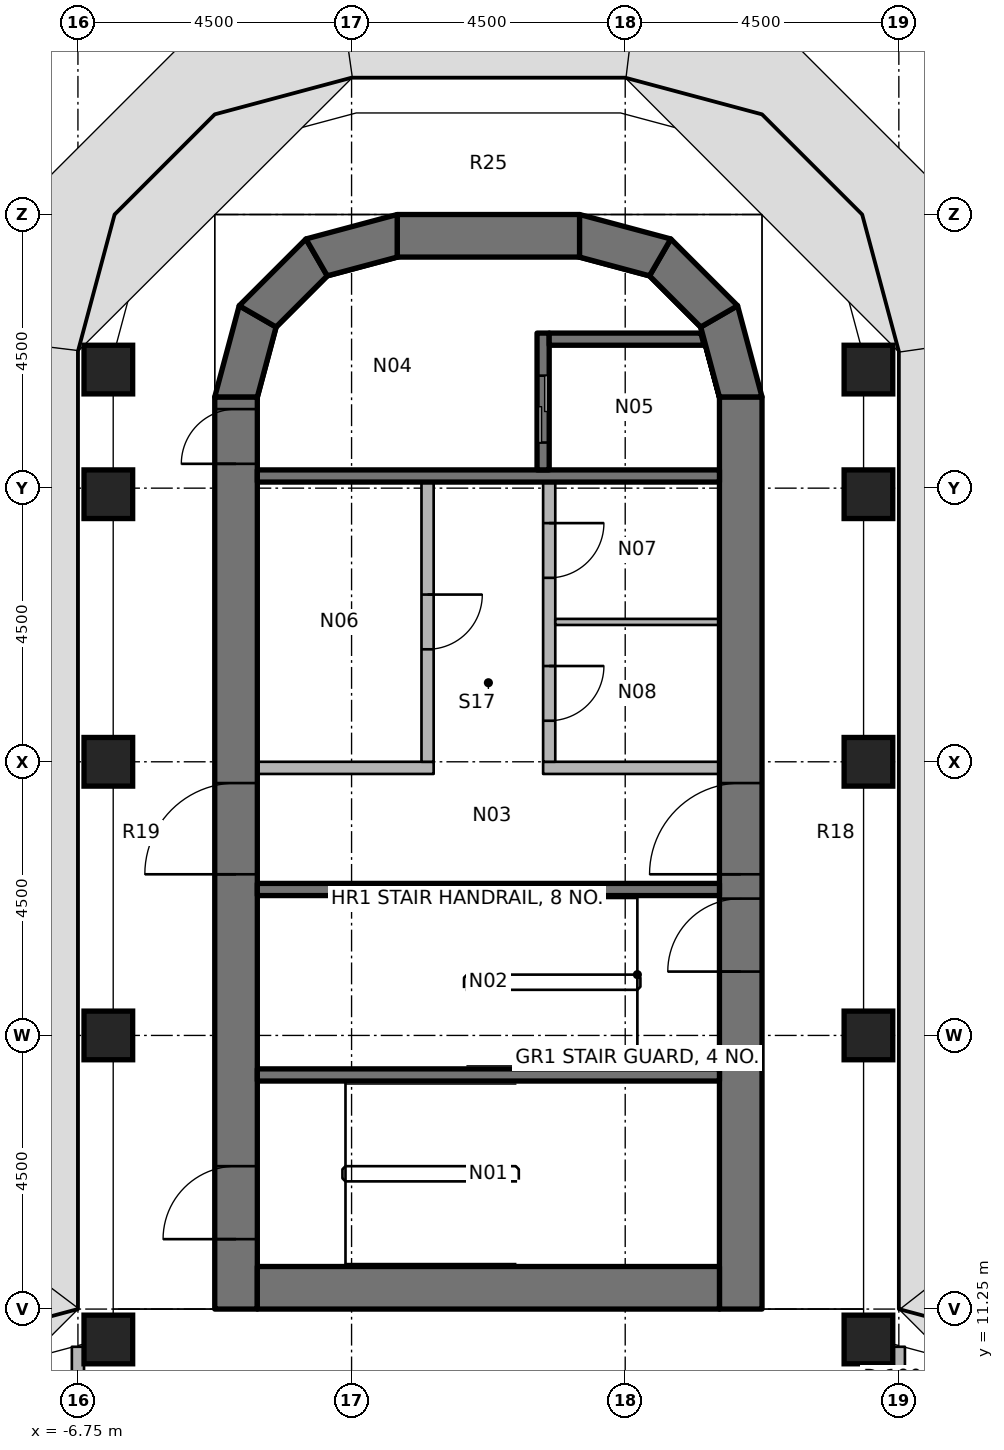
"""IFC4 building model, lengths in metres.
Left out: names, types, materials, properties, quantities, classifications, styles, units other than length and angle.
Written with IfcOpenShell. Run it as: python <this file> out.ifc"""

import sys

from ifc_helpers import new_model, si_unit, direction, frame, frame_2d, origin, origin_2d, place, context, subcontext, project, spatial, polyline, rectangle, outline, extrude, element, fill, save


model = new_model("IFC4")
c1 = context("Model", 3, precision=1e-05, world=origin(), true_north=direction((0.0, 1.0)))
c2 = subcontext(c1, "Body", "Model", "MODEL_VIEW")
j1 = project(units=[si_unit("LENGTHUNIT", "METRE"), si_unit("PLANEANGLEUNIT", "RADIAN")], contexts=[c1])
p1 = place(None, origin())
s1 = spatial("IfcSite", under=j1, at=p1, CompositionType="ELEMENT")
p2 = place(p1, origin())
s2 = spatial("IfcBuilding", under=s1, at=p2, CompositionType="ELEMENT")
p3 = place(p2, frame((0.0, 0.0, 179.0)))
s3 = spatial("IfcBuildingStorey", under=s2, at=p3, CompositionType="ELEMENT", Elevation=179.0)
for number, where, z_axis, x_axis in (
    (1, (-6.25, 10.75, 0.0), (0.0, 0.0, 1.0), (1.0, 0.0, 0.0)),
    (2, (-6.25, 15.75, 0.0), (0.0, 0.0, 1.0), (1.0, 0.0, 0.0)),
    (3, (-6.25, 20.25, 0.0), (0.0, 0.0, 1.0), (1.0, 0.0, 0.0)),
    (4, (-6.25, 24.65, 0.0), (0.0, 0.0, 1.0), (1.0, 0.0, 0.0)),
    (5, (-6.25, 26.7, 0.0), (0.0, 0.0, 1.0), (1.0, 0.0, 0.0)),
    (6, (6.25, 10.75, 0.0), (0.0, 0.0, 1.0), (1.0, 0.0, 0.0)),
    (7, (6.25, 15.75, 0.0), (0.0, 0.0, 1.0), (1.0, 0.0, 0.0)),
    (8, (6.25, 20.25, 0.0), (0.0, 0.0, 1.0), (1.0, 0.0, 0.0)),
    (9, (6.25, 24.65, 0.0), (0.0, 0.0, 1.0), (1.0, 0.0, 0.0)),
    (10, (6.25, 26.7, 0.0), (0.0, 0.0, 1.0), (1.0, 0.0, 0.0)),
):
    element("IfcColumn", number, at=place(p3, frame(where, z_axis=z_axis, x_axis=x_axis)), inside=s3, PredefinedType="COLUMN", context=c2, shape_type="SweptSolid", body=[
        extrude(rectangle(XDim=0.8, YDim=0.8, at=origin_2d()), origin(), (0.0, 0.0, 1.0), 3.65),
    ])
p4 = place(p3, frame((-4.15, 11.25, 0.0), z_axis=(0.0, 0.0, 1.0), x_axis=(0.0, 1.0, 0.0)))
e11 = element("IfcWall", 11, at=p4, inside=s3, PredefinedType="SHEAR", context=c2, shape_type="SweptSolid", body=[
    extrude(rectangle(XDim=15.0, YDim=0.7, at=frame_2d((7.5, 0.0))), origin(), (0.0, 0.0, 1.0), 3.8),
])
p5 = place(p4, frame((7.15, 0.0, 0.0)))
e12 = element("IfcOpeningElement", 12, at=p5, cuts=e11, PredefinedType="OPENING", context=c2, shape_type="SweptSolid", body=[
    extrude(rectangle(XDim=1.5, YDim=2.3, at=frame_2d((0.75, 1.15))), frame((0.0, 0.36, 0.0), z_axis=(0.0, -1.0, 0.0), x_axis=(1.0, 0.0, 0.0)), (0.0, 0.0, 1.0), 0.72),
])
p6 = place(p4, frame((13.9, 0.0, 0.0)))
e13 = element("IfcOpeningElement", 13, at=p6, cuts=e11, PredefinedType="OPENING", context=c2, shape_type="SweptSolid", body=[
    extrude(rectangle(XDim=0.9, YDim=2.1, at=frame_2d((0.45, 1.05))), frame((0.0, 0.36, 0.0), z_axis=(0.0, -1.0, 0.0), x_axis=(1.0, 0.0, 0.0)), (0.0, 0.0, 1.0), 0.72),
])
p7 = place(p4, frame((1.15, 0.0, 0.0)))
e14 = element("IfcOpeningElement", 14, at=p7, cuts=e11, PredefinedType="OPENING", context=c2, shape_type="SweptSolid", body=[
    extrude(rectangle(XDim=1.2, YDim=2.1, at=frame_2d((0.6, 1.05))), frame((0.0, 0.36, 0.0), z_axis=(0.0, -1.0, 0.0), x_axis=(1.0, 0.0, 0.0)), (0.0, 0.0, 1.0), 0.72),
])
p8 = place(p3, frame((4.15, 11.25, 0.0), z_axis=(0.0, 0.0, 1.0), x_axis=(0.0, 1.0, 0.0)))
e15 = element("IfcWall", 15, at=p8, inside=s3, PredefinedType="SHEAR", context=c2, shape_type="SweptSolid", body=[
    extrude(rectangle(XDim=15.0, YDim=0.7, at=frame_2d((7.5, 0.0))), origin(), (0.0, 0.0, 1.0), 3.8),
])
p9 = place(p8, frame((7.15, 0.0, 0.0)))
e16 = element("IfcOpeningElement", 16, at=p9, cuts=e15, PredefinedType="OPENING", context=c2, shape_type="SweptSolid", body=[
    extrude(rectangle(XDim=1.5, YDim=2.3, at=frame_2d((0.75, 1.15))), frame((0.0, 0.36, 0.0), z_axis=(0.0, -1.0, 0.0), x_axis=(1.0, 0.0, 0.0)), (0.0, 0.0, 1.0), 0.72),
])
p10 = place(p8, frame((5.55, 0.0, 0.0)))
e17 = element("IfcOpeningElement", 17, at=p10, cuts=e15, PredefinedType="OPENING", context=c2, shape_type="SweptSolid", body=[
    extrude(rectangle(XDim=1.2, YDim=2.1, at=frame_2d((0.6, 1.05))), frame((0.0, 0.36, 0.0), z_axis=(0.0, -1.0, 0.0), x_axis=(1.0, 0.0, 0.0)), (0.0, 0.0, 1.0), 0.72),
])
p11 = place(p3, frame((-3.8, 11.6, 0.0), z_axis=(0.0, 0.0, 1.0), x_axis=(1.0, 0.0, 0.0)))
e18 = element("IfcWall", 18, at=p11, inside=s3, PredefinedType="SHEAR", context=c2, shape_type="SweptSolid", body=[
    extrude(rectangle(XDim=7.6, YDim=0.7, at=frame_2d((3.8, 0.0))), origin(), (0.0, 0.0, 1.0), 3.8),
])
p12 = place(p3, frame((-1.5, 28.9, 0.0), z_axis=(0.0, 0.0, 1.0), x_axis=(1.0, 0.0, 0.0)))
e19 = element("IfcWall", 19, at=p12, inside=s3, PredefinedType="SHEAR", context=c2, shape_type="SweptSolid", body=[
    extrude(rectangle(XDim=3.0, YDim=0.7, at=frame_2d((1.5, 0.0))), origin(), (0.0, 0.0, 1.0), 3.8),
])
p13 = place(p3, origin())
e20 = element("IfcWall", 20, at=p13, inside=s3, PredefinedType="SHEAR", context=c2, shape_type="SweptSolid", body=[
    extrude(outline(polyline([(-4.5, 26.25), (-4.098, 27.75), (-3.492, 27.4), (-3.8, 26.25), (-4.5, 26.25)])), origin(), (0.0, 0.0, 1.0), 3.8),
])
p14 = place(p3, origin())
e21 = element("IfcWall", 21, at=p14, inside=s3, PredefinedType="SHEAR", context=c2, shape_type="SweptSolid", body=[
    extrude(outline(polyline([(-4.098, 27.75), (-3.0, 28.848), (-2.65, 28.242), (-3.492, 27.4), (-4.098, 27.75)])), origin(), (0.0, 0.0, 1.0), 3.8),
])
p15 = place(p3, origin())
e22 = element("IfcWall", 22, at=p15, inside=s3, PredefinedType="SHEAR", context=c2, shape_type="SweptSolid", body=[
    extrude(outline(polyline([(-3.0, 28.848), (-1.5, 29.25), (-1.5, 28.55), (-2.65, 28.242), (-3.0, 28.848)])), origin(), (0.0, 0.0, 1.0), 3.8),
])
p16 = place(p3, origin())
e23 = element("IfcWall", 23, at=p16, inside=s3, PredefinedType="SHEAR", context=c2, shape_type="SweptSolid", body=[
    extrude(outline(polyline([(4.5, 26.25), (4.098, 27.75), (3.492, 27.4), (3.8, 26.25), (4.5, 26.25)])), origin(), (0.0, 0.0, 1.0), 3.8),
])
p17 = place(p3, origin())
e24 = element("IfcWall", 24, at=p17, inside=s3, PredefinedType="SHEAR", context=c2, shape_type="SweptSolid", body=[
    extrude(outline(polyline([(4.098, 27.75), (3.0, 28.848), (2.65, 28.242), (3.492, 27.4), (4.098, 27.75)])), origin(), (0.0, 0.0, 1.0), 3.8),
])
p18 = place(p3, origin())
e25 = element("IfcWall", 25, at=p18, inside=s3, PredefinedType="SHEAR", context=c2, shape_type="SweptSolid", body=[
    extrude(outline(polyline([(3.0, 28.848), (1.5, 29.25), (1.5, 28.55), (2.65, 28.242), (3.0, 28.848)])), origin(), (0.0, 0.0, 1.0), 3.8),
])
p19 = place(p3, frame((-3.8, 24.95, 0.0), z_axis=(0.0, 0.0, 1.0), x_axis=(1.0, 0.0, 0.0)))
e26 = element("IfcWall", 26, at=p19, inside=s3, PredefinedType="SHEAR", context=c2, shape_type="SweptSolid", body=[
    extrude(rectangle(XDim=7.6, YDim=0.2, at=frame_2d((3.8, 0.0))), origin(), (0.0, 0.0, 1.0), 3.65),
])
p20 = place(p3, frame((0.9, 27.3, 0.0), z_axis=(0.0, 0.0, 1.0), x_axis=(0.0, -1.0, 0.0)))
e27 = element("IfcWall", 27, at=p20, inside=s3, PredefinedType="SHEAR", context=c2, shape_type="SweptSolid", body=[
    extrude(rectangle(XDim=2.25, YDim=0.2, at=frame_2d((1.125, 0.0))), origin(), (0.0, 0.0, 1.0), 3.65),
])
p21 = place(p20, frame((0.7, 0.0, 0.0)))
e28 = element("IfcOpeningElement", 28, at=p21, cuts=e27, PredefinedType="OPENING", context=c2, shape_type="SweptSolid", body=[
    extrude(rectangle(XDim=1.1, YDim=2.3, at=frame_2d((0.55, 1.15))), frame((0.0, 0.11, 0.0), z_axis=(0.0, -1.0, 0.0), x_axis=(1.0, 0.0, 0.0)), (0.0, 0.0, 1.0), 0.22),
])
p22 = place(p3, origin())
e29 = element("IfcWall", 29, at=p22, inside=s3, PredefinedType="SHEAR", context=c2, shape_type="SweptSolid", body=[
    extrude(outline(polyline([(1.0, 27.1), (3.548, 27.1), (3.494, 27.3), (1.0, 27.3), (1.0, 27.1)])), origin(), (0.0, 0.0, 1.0), 3.65),
])
for number, where, z_axis, x_axis in (
    (30, (-3.8, 18.15, 0.0), (0.0, 0.0, 1.0), (1.0, 0.0, 0.0)),
    (31, (-3.8, 15.1, 0.0), (0.0, 0.0, 1.0), (1.0, 0.0, 0.0)),
):
    element("IfcWall", number, at=place(p3, frame(where, z_axis=z_axis, x_axis=x_axis)), inside=s3, PredefinedType="SHEAR", context=c2, shape_type="SweptSolid", body=[
        extrude(rectangle(XDim=7.6, YDim=0.2, at=frame_2d((3.8, 0.0))), origin(), (0.0, 0.0, 1.0), 3.65),
    ])
p23 = place(p3, frame((-3.8, 20.15, 0.0), z_axis=(0.0, 0.0, 1.0), x_axis=(1.0, 0.0, 0.0)))
e32 = element("IfcWall", 32, at=p23, inside=s3, PredefinedType="PARTITIONING", context=c2, shape_type="SweptSolid", body=[
    extrude(rectangle(XDim=2.9, YDim=0.2, at=frame_2d((1.45, 0.0))), origin(), (0.0, 0.0, 1.0), 3.65),
])
p24 = place(p3, frame((-1.0, 24.85, 0.0), z_axis=(0.0, 0.0, 1.0), x_axis=(0.0, -1.0, 0.0)))
e33 = element("IfcWall", 33, at=p24, inside=s3, PredefinedType="PARTITIONING", context=c2, shape_type="SweptSolid", body=[
    extrude(rectangle(XDim=4.6, YDim=0.2, at=frame_2d((2.3, 0.0))), origin(), (0.0, 0.0, 1.0), 3.65),
])
p25 = place(p24, frame((1.85, 0.0, 0.0)))
e34 = element("IfcOpeningElement", 34, at=p25, cuts=e33, PredefinedType="OPENING", context=c2, shape_type="SweptSolid", body=[
    extrude(rectangle(XDim=0.9, YDim=2.1, at=frame_2d((0.45, 1.05))), frame((0.0, 0.11, 0.0), z_axis=(0.0, -1.0, 0.0), x_axis=(1.0, 0.0, 0.0)), (0.0, 0.0, 1.0), 0.22),
])
p26 = place(p3, frame((0.9, 20.15, 0.0), z_axis=(0.0, 0.0, 1.0), x_axis=(1.0, 0.0, 0.0)))
e35 = element("IfcWall", 35, at=p26, inside=s3, PredefinedType="PARTITIONING", context=c2, shape_type="SweptSolid", body=[
    extrude(rectangle(XDim=2.9, YDim=0.2, at=frame_2d((1.45, 0.0))), origin(), (0.0, 0.0, 1.0), 3.65),
])
p27 = place(p3, frame((1.0, 24.85, 0.0), z_axis=(0.0, 0.0, 1.0), x_axis=(0.0, -1.0, 0.0)))
e36 = element("IfcWall", 36, at=p27, inside=s3, PredefinedType="PARTITIONING", context=c2, shape_type="SweptSolid", body=[
    extrude(rectangle(XDim=4.6, YDim=0.2, at=frame_2d((2.3, 0.0))), origin(), (0.0, 0.0, 1.0), 3.65),
])
p28 = place(p27, frame((0.675, 0.0, 0.0)))
e37 = element("IfcOpeningElement", 37, at=p28, cuts=e36, PredefinedType="OPENING", context=c2, shape_type="SweptSolid", body=[
    extrude(rectangle(XDim=0.9, YDim=2.1, at=frame_2d((0.45, 1.05))), frame((0.0, 0.11, 0.0), z_axis=(0.0, -1.0, 0.0), x_axis=(1.0, 0.0, 0.0)), (0.0, 0.0, 1.0), 0.22),
])
p29 = place(p27, frame((3.025, 0.0, 0.0)))
e38 = element("IfcOpeningElement", 38, at=p29, cuts=e36, PredefinedType="OPENING", context=c2, shape_type="SweptSolid", body=[
    extrude(rectangle(XDim=0.9, YDim=2.1, at=frame_2d((0.45, 1.05))), frame((0.0, 0.11, 0.0), z_axis=(0.0, -1.0, 0.0), x_axis=(1.0, 0.0, 0.0)), (0.0, 0.0, 1.0), 0.22),
])
p30 = place(p3, frame((1.1, 22.55, 0.0), z_axis=(0.0, 0.0, 1.0), x_axis=(1.0, 0.0, 0.0)))
e39 = element("IfcWall", 39, at=p30, inside=s3, PredefinedType="PARTITIONING", context=c2, shape_type="SweptSolid", body=[
    extrude(rectangle(XDim=2.7, YDim=0.1, at=frame_2d((1.35, 0.0))), origin(), (0.0, 0.0, 1.0), 3.65),
])
p31 = place(p3, frame((6.75, 10.63, 0.0), z_axis=(0.0, 0.0, 1.0), x_axis=(0.0, -1.0, 0.0)))
e40 = element("IfcWall", 40, at=p31, inside=s3, PredefinedType="PARTITIONING", context=c2, shape_type="SweptSolid", body=[
    extrude(rectangle(XDim=3.78, YDim=0.2, at=frame_2d((1.89, 0.0))), origin(), (0.0, 0.0, 1.0), 2.75),
])
p32 = place(p31, frame((1.44, 0.0, 0.0)))
e41 = element("IfcOpeningElement", 41, at=p32, cuts=e40, PredefinedType="OPENING", context=c2, shape_type="SweptSolid", body=[
    extrude(rectangle(XDim=0.9, YDim=2.1, at=frame_2d((0.45, 1.05))), frame((0.0, 0.11, 0.0), z_axis=(0.0, -1.0, 0.0), x_axis=(1.0, 0.0, 0.0)), (0.0, 0.0, 1.0), 0.22),
])
p33 = place(p3, frame((-6.75, 6.85, 0.0), z_axis=(0.0, 0.0, 1.0), x_axis=(0.0, 1.0, 0.0)))
e42 = element("IfcWall", 42, at=p33, inside=s3, PredefinedType="PARTITIONING", context=c2, shape_type="SweptSolid", body=[
    extrude(rectangle(XDim=3.78, YDim=0.2, at=frame_2d((1.89, 0.0))), origin(), (0.0, 0.0, 1.0), 2.75),
])
p34 = place(p5, origin())
e43 = element("IfcDoor", 43, at=p34, inside=s3, OperationType="DOUBLE_DOOR_SINGLE_SWING", PredefinedType="DOOR", context=c2, shape_type="SweptSolid", body=[
    extrude(rectangle(XDim=1.5, YDim=2.3, at=frame_2d((0.75, 1.15))), frame((0.0, 0.025, 0.0), z_axis=(0.0, -1.0, 0.0), x_axis=(1.0, 0.0, 0.0)), (0.0, 0.0, 1.0), 0.05),
])
fill(e12, e43)
p35 = place(p9, origin())
e44 = element("IfcDoor", 44, at=p35, inside=s3, OperationType="DOUBLE_DOOR_SINGLE_SWING", PredefinedType="DOOR", context=c2, shape_type="SweptSolid", body=[
    extrude(rectangle(XDim=1.5, YDim=2.3, at=frame_2d((0.75, 1.15))), frame((0.0, 0.025, 0.0), z_axis=(0.0, -1.0, 0.0), x_axis=(1.0, 0.0, 0.0)), (0.0, 0.0, 1.0), 0.05),
])
fill(e16, e44)
p36 = place(p6, origin())
e45 = element("IfcDoor", 45, at=p36, inside=s3, OperationType="SINGLE_SWING_RIGHT", PredefinedType="DOOR", context=c2, shape_type="SweptSolid", body=[
    extrude(rectangle(XDim=0.9, YDim=2.1, at=frame_2d((0.45, 1.05))), frame((0.0, 0.025, 0.0), z_axis=(0.0, -1.0, 0.0), x_axis=(1.0, 0.0, 0.0)), (0.0, 0.0, 1.0), 0.05),
])
fill(e13, e45)
p37 = place(p10, origin())
e46 = element("IfcDoor", 46, at=p37, inside=s3, OperationType="SINGLE_SWING_LEFT", PredefinedType="DOOR", context=c2, shape_type="SweptSolid", body=[
    extrude(rectangle(XDim=1.2, YDim=2.1, at=frame_2d((0.6, 1.05))), frame((0.0, 0.025, 0.0), z_axis=(0.0, -1.0, 0.0), x_axis=(1.0, 0.0, 0.0)), (0.0, 0.0, 1.0), 0.05),
])
fill(e17, e46)
p38 = place(p7, origin())
e47 = element("IfcDoor", 47, at=p38, inside=s3, OperationType="SINGLE_SWING_RIGHT", PredefinedType="DOOR", context=c2, shape_type="SweptSolid", body=[
    extrude(rectangle(XDim=1.2, YDim=2.1, at=frame_2d((0.6, 1.05))), frame((0.0, 0.025, 0.0), z_axis=(0.0, -1.0, 0.0), x_axis=(1.0, 0.0, 0.0)), (0.0, 0.0, 1.0), 0.05),
])
fill(e14, e47)
p39 = place(p21, origin())
e48 = element("IfcDoor", 48, at=p39, inside=s3, OperationType="DOUBLE_DOOR_SLIDING", PredefinedType="DOOR", context=c2, shape_type="SweptSolid", body=[
    extrude(rectangle(XDim=1.1, YDim=2.3, at=frame_2d((0.55, 1.15))), frame((0.0, 0.025, 0.0), z_axis=(0.0, -1.0, 0.0), x_axis=(1.0, 0.0, 0.0)), (0.0, 0.0, 1.0), 0.05),
])
fill(e28, e48)
p40 = place(p25, origin())
e49 = element("IfcDoor", 49, at=p40, inside=s3, OperationType="SINGLE_SWING_RIGHT", PredefinedType="DOOR", context=c2, shape_type="SweptSolid", body=[
    extrude(rectangle(XDim=0.9, YDim=2.1, at=frame_2d((0.45, 1.05))), frame((0.0, 0.025, 0.0), z_axis=(0.0, -1.0, 0.0), x_axis=(1.0, 0.0, 0.0)), (0.0, 0.0, 1.0), 0.05),
])
fill(e34, e49)
p41 = place(p28, origin())
e50 = element("IfcDoor", 50, at=p41, inside=s3, OperationType="SINGLE_SWING_LEFT", PredefinedType="DOOR", context=c2, shape_type="SweptSolid", body=[
    extrude(rectangle(XDim=0.9, YDim=2.1, at=frame_2d((0.45, 1.05))), frame((0.0, 0.025, 0.0), z_axis=(0.0, -1.0, 0.0), x_axis=(1.0, 0.0, 0.0)), (0.0, 0.0, 1.0), 0.05),
])
fill(e37, e50)
p42 = place(p29, origin())
e51 = element("IfcDoor", 51, at=p42, inside=s3, OperationType="SINGLE_SWING_LEFT", PredefinedType="DOOR", context=c2, shape_type="SweptSolid", body=[
    extrude(rectangle(XDim=0.9, YDim=2.1, at=frame_2d((0.45, 1.05))), frame((0.0, 0.025, 0.0), z_axis=(0.0, -1.0, 0.0), x_axis=(1.0, 0.0, 0.0)), (0.0, 0.0, 1.0), 0.05),
])
fill(e38, e51)
save(model, sys.argv[1])
